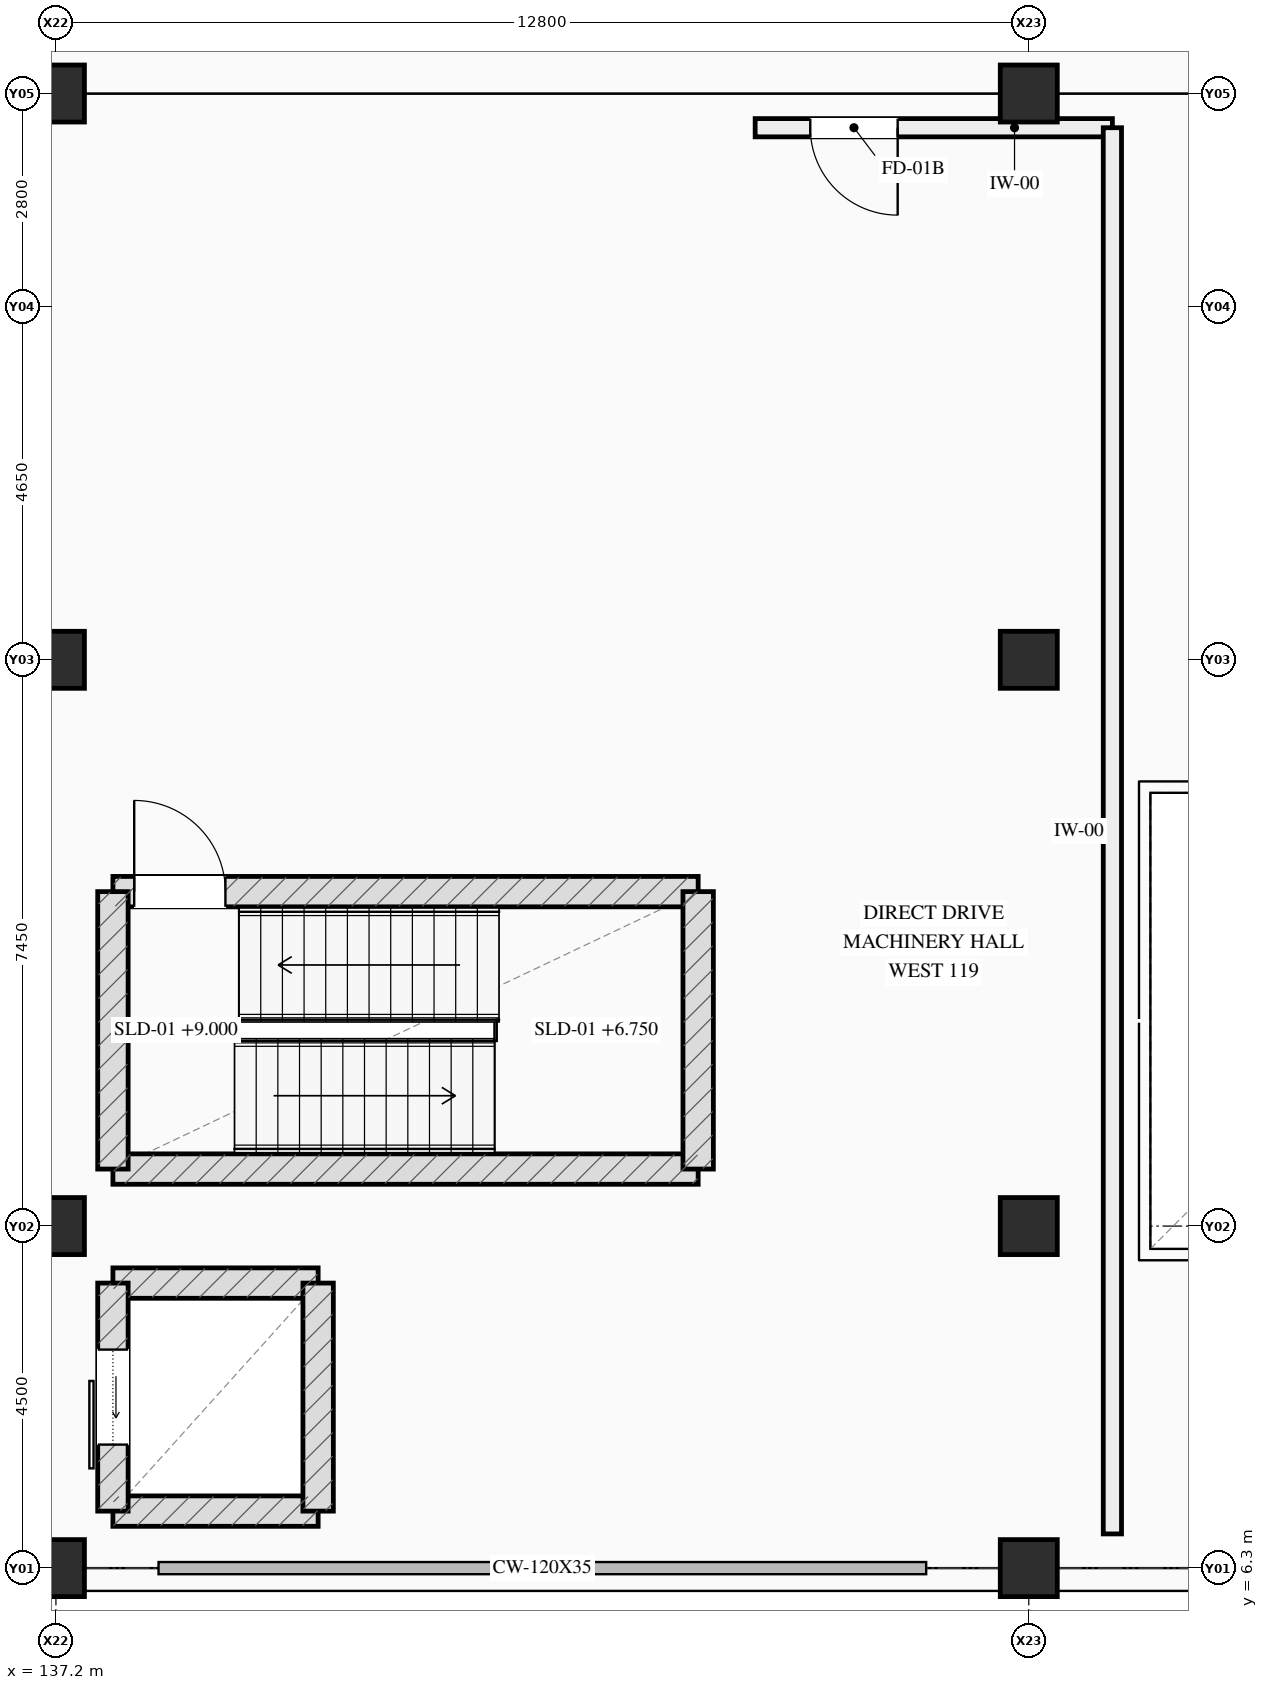
"""IFC4 building model, lengths in metres.
Left out: names, types, materials, properties, quantities, classifications, styles, units other than length and angle.
Written with IfcOpenShell. Run it as: python <this file> out.ifc"""

import sys

from ifc_helpers import new_model, si_unit, direction, frame, frame_2d, origin, origin_2d, place, context, subcontext, project, spatial, rectangle, extrude, element, fill, save


model = new_model("IFC4")
c1 = context("Model", 3, precision=1e-05, world=origin(), true_north=direction((0.0, 1.0)))
c2 = subcontext(c1, "Body", "Model", "MODEL_VIEW")
j1 = project(units=[si_unit("LENGTHUNIT", "METRE"), si_unit("PLANEANGLEUNIT", "RADIAN")], contexts=[c1])
p1 = place(None, origin())
s1 = spatial("IfcSite", under=j1, at=p1, CompositionType="ELEMENT")
p2 = place(p1, origin())
s2 = spatial("IfcBuilding", under=s1, at=p2, CompositionType="ELEMENT")
p3 = place(p2, frame((0.0, 0.0, 4.5)))
s3 = spatial("IfcBuildingStorey", under=s2, at=p3, CompositionType="ELEMENT", Elevation=4.5)
for number, where, z_axis, x_axis in (
    (1, (137.2, 6.3, 0.0), (0.0, 0.0, 1.0), (1.0, 0.0, 0.0)),
    (2, (137.2, 10.8, 0.0), (0.0, 0.0, 1.0), (1.0, 0.0, 0.0)),
    (3, (137.2, 18.25, 0.0), (0.0, 0.0, 1.0), (1.0, 0.0, 0.0)),
    (4, (137.2, 25.7, 0.0), (0.0, 0.0, 1.0), (1.0, 0.0, 0.0)),
    (5, (150.0, 6.3, 0.0), (0.0, 0.0, 1.0), (1.0, 0.0, 0.0)),
    (6, (150.0, 10.8, 0.0), (0.0, 0.0, 1.0), (1.0, 0.0, 0.0)),
    (7, (150.0, 18.25, 0.0), (0.0, 0.0, 1.0), (1.0, 0.0, 0.0)),
    (8, (150.0, 25.7, 0.0), (0.0, 0.0, 1.0), (1.0, 0.0, 0.0)),
):
    element("IfcColumn", number, at=place(p3, frame(where, z_axis=z_axis, x_axis=x_axis)), inside=s3, PredefinedType="COLUMN", context=c2, shape_type="SweptSolid", body=[
        extrude(rectangle(XDim=0.75, YDim=0.75, at=origin_2d()), origin(), (0.0, 0.0, 1.0), 4.5),
    ])
p4 = place(p3, frame((137.95, 11.55, 0.0), z_axis=(0.0, 0.0, 1.0), x_axis=(1.0, 0.0, 0.0)))
e9 = element("IfcWall", 9, at=p4, inside=s3, PredefinedType="SHEAR", context=c2, shape_type="SweptSolid", body=[
    extrude(rectangle(XDim=7.7, YDim=0.4, at=frame_2d((3.85, 0.0))), origin(), (0.0, 0.0, 1.0), 4.2),
])
p5 = place(p3, frame((145.65, 15.2, 0.0), z_axis=(0.0, 0.0, 1.0), x_axis=(-1.0, 0.0, 0.0)))
e10 = element("IfcWall", 10, at=p5, inside=s3, PredefinedType="SHEAR", context=c2, shape_type="SweptSolid", body=[
    extrude(rectangle(XDim=7.7, YDim=0.4, at=frame_2d((3.85, 0.0))), origin(), (0.0, 0.0, 1.0), 4.2),
])
p6 = place(p5, frame((6.22, 0.0, 0.0)))
e11 = element("IfcOpeningElement", 11, at=p6, cuts=e10, PredefinedType="OPENING", context=c2, shape_type="SweptSolid", body=[
    extrude(rectangle(XDim=1.2, YDim=2.2, at=frame_2d((0.6, 1.1))), frame((0.0, 0.21, 0.0), z_axis=(0.0, -1.0, 0.0), x_axis=(1.0, 0.0, 0.0)), (0.0, 0.0, 1.0), 0.42),
])
for number, where, z_axis, x_axis in (
    (12, (137.95, 15.2, 0.0), (0.0, 0.0, 1.0), (0.0, -1.0, 0.0)),
    (13, (145.65, 11.55, 0.0), (0.0, 0.0, 1.0), (0.0, 1.0, 0.0)),
):
    element("IfcWall", number, at=place(p3, frame(where, z_axis=z_axis, x_axis=x_axis)), inside=s3, PredefinedType="SHEAR", context=c2, shape_type="SweptSolid", body=[
        extrude(rectangle(XDim=3.65, YDim=0.4, at=frame_2d((1.825, 0.0))), origin(), (0.0, 0.0, 1.0), 4.2),
    ])
for number, where, z_axis, x_axis in (
    (14, (137.95, 7.05, 0.0), (0.0, 0.0, 1.0), (1.0, 0.0, 0.0)),
    (15, (137.95, 10.05, 0.0), (0.0, 0.0, 1.0), (1.0, 0.0, 0.0)),
):
    element("IfcWall", number, at=place(p3, frame(where, z_axis=z_axis, x_axis=x_axis)), inside=s3, PredefinedType="SHEAR", context=c2, shape_type="SweptSolid", body=[
        extrude(rectangle(XDim=2.7, YDim=0.4, at=frame_2d((1.35, 0.0))), origin(), (0.0, 0.0, 1.0), 4.2),
    ])
p7 = place(p3, frame((137.95, 7.05, 0.0), z_axis=(0.0, 0.0, 1.0), x_axis=(0.0, 1.0, 0.0)))
e16 = element("IfcWall", 16, at=p7, inside=s3, PredefinedType="SHEAR", context=c2, shape_type="SweptSolid", body=[
    extrude(rectangle(XDim=3.0, YDim=0.4, at=frame_2d((1.5, 0.0))), origin(), (0.0, 0.0, 1.0), 4.2),
])
p8 = place(p7, frame((0.875, 0.0, 0.0)))
e17 = element("IfcOpeningElement", 17, at=p8, cuts=e16, PredefinedType="OPENING", context=c2, shape_type="SweptSolid", body=[
    extrude(rectangle(XDim=1.25, YDim=2.2, at=frame_2d((0.625, 1.1))), frame((0.0, 0.21, 0.0), z_axis=(0.0, -1.0, 0.0), x_axis=(1.0, 0.0, 0.0)), (0.0, 0.0, 1.0), 0.42),
])
p9 = place(p3, frame((140.65, 7.05, 0.0), z_axis=(0.0, 0.0, 1.0), x_axis=(0.0, 1.0, 0.0)))
e18 = element("IfcWall", 18, at=p9, inside=s3, PredefinedType="SHEAR", context=c2, shape_type="SweptSolid", body=[
    extrude(rectangle(XDim=3.0, YDim=0.4, at=frame_2d((1.5, 0.0))), origin(), (0.0, 0.0, 1.0), 4.2),
])
p10 = place(p3, frame((146.4, 25.25, 0.0), z_axis=(0.0, 0.0, 1.0), x_axis=(1.0, 0.0, 0.0)))
e19 = element("IfcWall", 19, at=p10, inside=s3, PredefinedType="SOLIDWALL", context=c2, shape_type="SweptSolid", body=[
    extrude(rectangle(XDim=4.7, YDim=0.24, at=frame_2d((2.35, 0.0))), origin(), (0.0, 0.0, 1.0), 3.3),
])
p11 = place(p10, frame((0.725, 0.0, 0.0)))
e20 = element("IfcOpeningElement", 20, at=p11, cuts=e19, PredefinedType="OPENING", context=c2, shape_type="SweptSolid", body=[
    extrude(rectangle(XDim=1.15, YDim=2.2, at=frame_2d((0.575, 1.1))), frame((0.0, 0.13, 0.0), z_axis=(0.0, -1.0, 0.0), x_axis=(1.0, 0.0, 0.0)), (0.0, 0.0, 1.0), 0.26),
])
p12 = place(p3, frame((151.1, 6.75, 0.0), z_axis=(0.0, 0.0, 1.0), x_axis=(0.0, 1.0, 0.0)))
e21 = element("IfcWall", 21, at=p12, inside=s3, PredefinedType="SOLIDWALL", context=c2, shape_type="SweptSolid", body=[
    extrude(rectangle(XDim=18.5, YDim=0.24, at=frame_2d((9.25, 0.0))), origin(), (0.0, 0.0, 1.0), 3.3),
])
p13 = place(p6, origin())
e22 = element("IfcDoor", 22, at=p13, inside=s3, OperationType="SINGLE_SWING_RIGHT", PredefinedType="DOOR", context=c2, shape_type="SweptSolid", body=[
    extrude(rectangle(XDim=1.2, YDim=2.2, at=frame_2d((0.6, 1.1))), frame((0.0, 0.025, 0.0), z_axis=(0.0, -1.0, 0.0), x_axis=(1.0, 0.0, 0.0)), (0.0, 0.0, 1.0), 0.05),
])
fill(e11, e22)
p14 = place(p8, origin())
e23 = element("IfcDoor", 23, at=p14, inside=s3, OperationType="SLIDING_TO_LEFT", PredefinedType="DOOR", context=c2, shape_type="SweptSolid", body=[
    extrude(rectangle(XDim=1.25, YDim=2.2, at=frame_2d((0.625, 1.1))), frame((0.0, 0.025, 0.0), z_axis=(0.0, -1.0, 0.0), x_axis=(1.0, 0.0, 0.0)), (0.0, 0.0, 1.0), 0.05),
])
fill(e17, e23)
p15 = place(p11, origin())
e24 = element("IfcDoor", 24, at=p15, inside=s3, OperationType="SINGLE_SWING_RIGHT", PredefinedType="DOOR", context=c2, shape_type="SweptSolid", body=[
    extrude(rectangle(XDim=1.15, YDim=2.2, at=frame_2d((0.575, 1.1))), frame((0.0, 0.025, 0.0), z_axis=(0.0, -1.0, 0.0), x_axis=(1.0, 0.0, 0.0)), (0.0, 0.0, 1.0), 0.05),
])
fill(e20, e24)
save(model, sys.argv[1])
